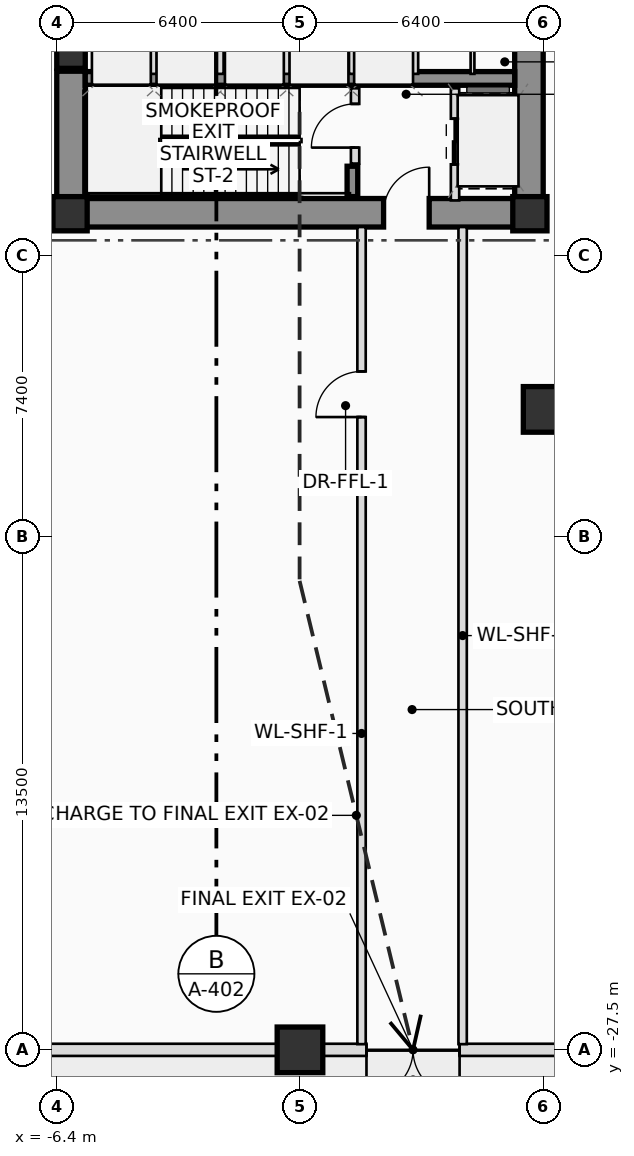
"""IFC4 building model, lengths in metres.
Left out: names, types, materials, properties, quantities, classifications, styles, units other than length and angle.
Written with IfcOpenShell. Run it as: python <this file> out.ifc"""

import sys

from ifc_helpers import new_model, si_unit, direction, frame, frame_2d, origin, origin_2d, place, context, subcontext, project, spatial, rectangle, extrude, source, transform, mapped, element, fill, save


model = new_model("IFC4")
c1 = context("Model", 3, precision=1e-05, world=origin(), true_north=direction((0.0, 1.0)))
c2 = subcontext(c1, "Body", "Model", "MODEL_VIEW")
j1 = project(units=[si_unit("LENGTHUNIT", "METRE"), si_unit("PLANEANGLEUNIT", "RADIAN")], contexts=[c1])
p1 = place(None, origin())
s1 = spatial("IfcSite", under=j1, at=p1, CompositionType="ELEMENT")
p2 = place(p1, origin())
s2 = spatial("IfcBuilding", under=s1, at=p2, CompositionType="ELEMENT")
p3 = place(p2, origin())
s3 = spatial("IfcBuildingStorey", under=s2, at=p3, CompositionType="ELEMENT", Elevation=0.0)
m1 = source(origin(), c2, "Body", "SweptSolid", [
    extrude(rectangle(XDim=0.9, YDim=0.9, at=origin_2d()), origin(), (0.0, 0.0, 1.0), 4.5),
])
for number, where, z_axis, x_axis in (
    (1, (-6.05, -5.5, 0.0), (0.0, 0.0, 1.0), (1.0, 0.0, 0.0)),
    (2, (6.05, -5.5, 0.0), (0.0, 0.0, 1.0), (1.0, 0.0, 0.0)),
):
    element("IfcColumn", number, at=place(p3, frame(where, z_axis=z_axis, x_axis=x_axis)), inside=s3, PredefinedType="COLUMN", context=c2, shape_type="MappedRepresentation", body=[
        mapped(m1, transform((0.0, 0.0, 0.0), scale=1.0)),
    ])
p4 = place(p3, frame((-6.4, -5.475, 0.0), z_axis=(0.0, 0.0, 1.0), x_axis=(1.0, 0.0, 0.0)))
e3 = element("IfcWall", 3, at=p4, inside=s3, PredefinedType="SHEAR", context=c2, shape_type="SweptSolid", body=[
    extrude(rectangle(XDim=12.8, YDim=0.75, at=frame_2d((6.4, 0.0))), origin(), (0.0, 0.0, 1.0), 4.5),
])
p5 = place(p4, frame((8.6, 0.0, 0.0)))
e4 = element("IfcOpeningElement", 4, at=p5, cuts=e3, PredefinedType="OPENING", context=c2, shape_type="SweptSolid", body=[
    extrude(rectangle(XDim=1.2, YDim=2.2, at=frame_2d((0.6, 1.1))), frame((0.0, 0.385, 0.0), z_axis=(0.0, -1.0, 0.0), x_axis=(1.0, 0.0, 0.0)), (0.0, 0.0, 1.0), 0.77),
])
p6 = place(p3, frame((6.025, -5.1, 0.0), z_axis=(0.0, 0.0, 1.0), x_axis=(0.0, 1.0, 0.0)))
e5 = element("IfcWall", 5, at=p6, inside=s3, PredefinedType="SHEAR", context=c2, shape_type="SweptSolid", body=[
    extrude(rectangle(XDim=10.2, YDim=0.75, at=frame_2d((5.1, 0.0))), origin(), (0.0, 0.0, 1.0), 4.5),
])
p7 = place(p3, frame((-6.025, -5.1, 0.0), z_axis=(0.0, 0.0, 1.0), x_axis=(0.0, 1.0, 0.0)))
e6 = element("IfcWall", 6, at=p7, inside=s3, PredefinedType="SHEAR", context=c2, shape_type="SweptSolid", body=[
    extrude(rectangle(XDim=3.35, YDim=0.75, at=frame_2d((1.675, 0.0))), origin(), (0.0, 0.0, 1.0), 4.5),
])
p8 = place(p3, frame((-5.65, -1.94, 0.0), z_axis=(0.0, 0.0, 1.0), x_axis=(1.0, 0.0, 0.0)))
e7 = element("IfcWall", 7, at=p8, inside=s3, PredefinedType="SHEAR", context=c2, shape_type="SweptSolid", body=[
    extrude(rectangle(XDim=11.3, YDim=0.36, at=frame_2d((5.65, 0.0))), origin(), (0.0, 0.0, 1.0), 4.5),
])
p9 = place(p3, frame((-5.52, -5.05, 0.0), z_axis=(0.0, 0.0, 1.0), x_axis=(0.0, 1.0, 0.0)))
e8 = element("IfcWall", 8, at=p9, inside=s3, PredefinedType="SHEAR", context=c2, shape_type="SweptSolid", body=[
    extrude(rectangle(XDim=2.75, YDim=0.28, at=frame_2d((1.375, 0.0))), origin(), (0.0, 0.0, 1.0), 4.5),
])
p10 = place(p3, frame((1.38, -5.05, 0.0), z_axis=(0.0, 0.0, 1.0), x_axis=(0.0, 1.0, 0.0)))
e9 = element("IfcWall", 9, at=p10, inside=s3, PredefinedType="SHEAR", context=c2, shape_type="SweptSolid", body=[
    extrude(rectangle(XDim=0.8, YDim=0.28, at=frame_2d((0.4, 0.0))), origin(), (0.0, 0.0, 1.0), 4.5),
])
m2 = source(origin(), c2, "Body", "SweptSolid", [
    extrude(rectangle(XDim=0.75, YDim=0.75, at=origin_2d()), origin(), (0.0, 0.0, 1.0), 4.5),
])
p11 = place(p3, frame((-6.025, -1.3, 0.0), z_axis=(0.0, 0.0, 1.0), x_axis=(1.0, 0.0, 0.0)))
e10 = element("IfcColumn", 10, at=p11, inside=s3, PredefinedType="COLUMN", context=c2, shape_type="MappedRepresentation", body=[
    mapped(m2, transform((0.0, 0.0, 0.0), scale=1.0)),
])
m3 = source(origin(), c2, "Body", "SweptSolid", [
    extrude(rectangle(XDim=1.2, YDim=1.2, at=origin_2d()), origin(), (0.0, 0.0, 1.0), 4.5),
])
for number, where, z_axis, x_axis in (
    (11, (0.0, -27.5, 0.0), (0.0, 0.0, 1.0), (1.0, 0.0, 0.0)),
    (12, (6.477, -10.648, 0.0), (0.0, 0.0, 1.0), (1.0, 0.0, 0.0)),
):
    element("IfcColumn", number, at=place(p3, frame(where, z_axis=z_axis, x_axis=x_axis)), inside=s3, PredefinedType="COLUMN", context=c2, shape_type="MappedRepresentation", body=[
        mapped(m3, transform((0.0, 0.0, 0.0), scale=1.0)),
    ])
p12 = place(p3, frame((34.0, -27.5, 0.0), z_axis=(0.0, 0.0, 1.0), x_axis=(-1.0, 0.0, 0.0)))
e13 = element("IfcWall", 13, at=p12, inside=s3, PredefinedType="SOLIDWALL", context=c2, shape_type="SweptSolid", body=[
    extrude(rectangle(XDim=68.0, YDim=0.32, at=frame_2d((34.0, 0.0))), origin(), (0.0, 0.0, 1.0), 3.25),
])
p13 = place(p12, frame((29.8, 0.0, 0.0)))
e14 = element("IfcOpeningElement", 14, at=p13, cuts=e13, PredefinedType="OPENING", context=c2, shape_type="SweptSolid", body=[
    extrude(rectangle(XDim=2.45, YDim=2.55, at=frame_2d((1.225, 1.275))), frame((0.0, 0.17, 0.0), z_axis=(0.0, -1.0, 0.0), x_axis=(1.0, 0.0, 0.0)), (0.0, 0.0, 1.0), 0.34),
])
p14 = place(p12, frame((50.0, 0.0, 0.0)))
e15 = element("IfcOpeningElement", 15, at=p14, cuts=e13, PredefinedType="OPENING", context=c2, shape_type="SweptSolid", body=[
    extrude(rectangle(XDim=2.5, YDim=2.6, at=frame_2d((1.25, 1.3))), frame((0.0, 0.17, 0.0), z_axis=(0.0, -1.0, 0.0), x_axis=(1.0, 0.0, 0.0)), (0.0, 0.0, 1.0), 0.34),
])
p15 = place(p3, frame((1.45, -4.18, 0.0), z_axis=(0.0, 0.0, 1.0), x_axis=(0.0, 1.0, 0.0)))
e16 = element("IfcWall", 16, at=p15, inside=s3, PredefinedType="PLUMBINGWALL", context=c2, shape_type="SweptSolid", body=[
    extrude(rectangle(XDim=1.98, YDim=0.22, at=frame_2d((0.99, 0.0))), origin(), (0.0, 0.0, 1.0), 4.17),
])
p16 = place(p15, frame((0.42, 0.0, 0.0)))
e17 = element("IfcOpeningElement", 17, at=p16, cuts=e16, PredefinedType="OPENING", context=c2, shape_type="SweptSolid", body=[
    extrude(rectangle(XDim=1.15, YDim=2.15, at=frame_2d((0.575, 1.075))), frame((0.0, 0.12, 0.0), z_axis=(0.0, -1.0, 0.0), x_axis=(1.0, 0.0, 0.0)), (0.0, 0.0, 1.0), 0.24),
])
p17 = place(p3, frame((4.08, -5.15, 0.0), z_axis=(0.0, 0.0, 1.0), x_axis=(0.0, 1.0, 0.0)))
e18 = element("IfcWall", 18, at=p17, inside=s3, PredefinedType="PLUMBINGWALL", context=c2, shape_type="SweptSolid", body=[
    extrude(rectangle(XDim=2.95, YDim=0.22, at=frame_2d((1.475, 0.0))), origin(), (0.0, 0.0, 1.0), 4.17),
])
p18 = place(p17, frame((0.95, 0.0, 0.0)))
e19 = element("IfcOpeningElement", 19, at=p18, cuts=e18, PredefinedType="OPENING", context=c2, shape_type="SweptSolid", body=[
    extrude(rectangle(XDim=1.2, YDim=2.25, at=frame_2d((0.6, 1.125))), frame((0.0, 0.12, 0.0), z_axis=(0.0, -1.0, 0.0), x_axis=(1.0, 0.0, 0.0)), (0.0, 0.0, 1.0), 0.24),
])
for number, where, z_axis, x_axis in (
    (20, (-3.85, -1.82, 0.0), (0.0, 0.0, 1.0), (0.0, 1.0, 0.0)),
    (21, (-2.1, -1.82, 0.0), (0.0, 0.0, 1.0), (0.0, 1.0, 0.0)),
    (22, (-0.35, -1.82, 0.0), (0.0, 0.0, 1.0), (0.0, 1.0, 0.0)),
    (23, (1.38, -1.82, 0.0), (0.0, 0.0, 1.0), (0.0, 1.0, 0.0)),
    (24, (3.02, -1.82, 0.0), (0.0, 0.0, 1.0), (0.0, 1.0, 0.0)),
):
    element("IfcWall", number, at=place(p3, frame(where, z_axis=z_axis, x_axis=x_axis)), inside=s3, PredefinedType="PLUMBINGWALL", context=c2, shape_type="SweptSolid", body=[
        extrude(rectangle(XDim=0.98, YDim=0.18, at=frame_2d((0.49, 0.0))), origin(), (0.0, 0.0, 1.0), 4.17),
    ])
p19 = place(p3, frame((4.54, -1.82, 0.0), z_axis=(0.0, 0.0, 1.0), x_axis=(0.0, 1.0, 0.0)))
e25 = element("IfcWall", 25, at=p19, inside=s3, PredefinedType="PARTITIONING", context=c2, shape_type="SweptSolid", body=[
    extrude(rectangle(XDim=0.98, YDim=0.1, at=frame_2d((0.49, 0.0))), origin(), (0.0, 0.0, 1.0), 4.17),
])
p20 = place(p3, frame((1.62, -27.35, 0.0), z_axis=(0.0, 0.0, 1.0), x_axis=(0.0, 1.0, 0.0)))
e26 = element("IfcWall", 26, at=p20, inside=s3, PredefinedType="PLUMBINGWALL", context=c2, shape_type="SweptSolid", body=[
    extrude(rectangle(XDim=21.5, YDim=0.22, at=frame_2d((10.75, 0.0))), origin(), (0.0, 0.0, 1.0), 3.275),
])
p21 = place(p20, frame((16.5, 0.0, 0.0)))
e27 = element("IfcOpeningElement", 27, at=p21, cuts=e26, PredefinedType="OPENING", context=c2, shape_type="SweptSolid", body=[
    extrude(rectangle(XDim=1.2, YDim=2.2, at=frame_2d((0.6, 1.1))), frame((0.0, 0.12, 0.0), z_axis=(0.0, -1.0, 0.0), x_axis=(1.0, 0.0, 0.0)), (0.0, 0.0, 1.0), 0.24),
])
p22 = place(p3, frame((4.28, -27.35, 0.0), z_axis=(0.0, 0.0, 1.0), x_axis=(0.0, 1.0, 0.0)))
e28 = element("IfcWall", 28, at=p22, inside=s3, PredefinedType="PLUMBINGWALL", context=c2, shape_type="SweptSolid", body=[
    extrude(rectangle(XDim=21.5, YDim=0.22, at=frame_2d((10.75, 0.0))), origin(), (0.0, 0.0, 1.0), 3.275),
])
p23 = place(p13, origin())
e29 = element("IfcDoor", 29, at=p23, inside=s3, OperationType="DOUBLE_DOOR_SINGLE_SWING", PredefinedType="DOOR", context=c2, shape_type="SweptSolid", body=[
    extrude(rectangle(XDim=2.45, YDim=2.55, at=frame_2d((1.225, 1.275))), frame((0.0, 0.025, 0.0), z_axis=(0.0, -1.0, 0.0), x_axis=(1.0, 0.0, 0.0)), (0.0, 0.0, 1.0), 0.05),
])
fill(e14, e29)
p24 = place(p5, origin())
e30 = element("IfcDoor", 30, at=p24, inside=s3, OperationType="SINGLE_SWING_RIGHT", PredefinedType="DOOR", context=c2, shape_type="SweptSolid", body=[
    extrude(rectangle(XDim=1.2, YDim=2.2, at=frame_2d((0.6, 1.1))), frame((0.0, 0.025, 0.0), z_axis=(0.0, -1.0, 0.0), x_axis=(1.0, 0.0, 0.0)), (0.0, 0.0, 1.0), 0.05),
])
fill(e4, e30)
p25 = place(p16, origin())
e31 = element("IfcDoor", 31, at=p25, inside=s3, OperationType="SINGLE_SWING_LEFT", PredefinedType="DOOR", context=c2, shape_type="SweptSolid", body=[
    extrude(rectangle(XDim=1.15, YDim=2.15, at=frame_2d((0.575, 1.075))), frame((0.0, 0.025, 0.0), z_axis=(0.0, -1.0, 0.0), x_axis=(1.0, 0.0, 0.0)), (0.0, 0.0, 1.0), 0.05),
])
fill(e17, e31)
p26 = place(p18, origin())
e32 = element("IfcDoor", 32, at=p26, inside=s3, OperationType="DOUBLE_DOOR_SLIDING", PredefinedType="DOOR", context=c2, shape_type="SweptSolid", body=[
    extrude(rectangle(XDim=1.2, YDim=2.25, at=frame_2d((0.6, 1.125))), frame((0.0, 0.025, 0.0), z_axis=(0.0, -1.0, 0.0), x_axis=(1.0, 0.0, 0.0)), (0.0, 0.0, 1.0), 0.05),
])
fill(e19, e32)
p27 = place(p21, origin())
e33 = element("IfcDoor", 33, at=p27, inside=s3, OperationType="SINGLE_SWING_LEFT", PredefinedType="DOOR", context=c2, shape_type="SweptSolid", body=[
    extrude(rectangle(XDim=1.2, YDim=2.2, at=frame_2d((0.6, 1.1))), frame((0.0, 0.025, 0.0), z_axis=(0.0, -1.0, 0.0), x_axis=(1.0, 0.0, 0.0)), (0.0, 0.0, 1.0), 0.05),
])
fill(e27, e33)
save(model, sys.argv[1])
